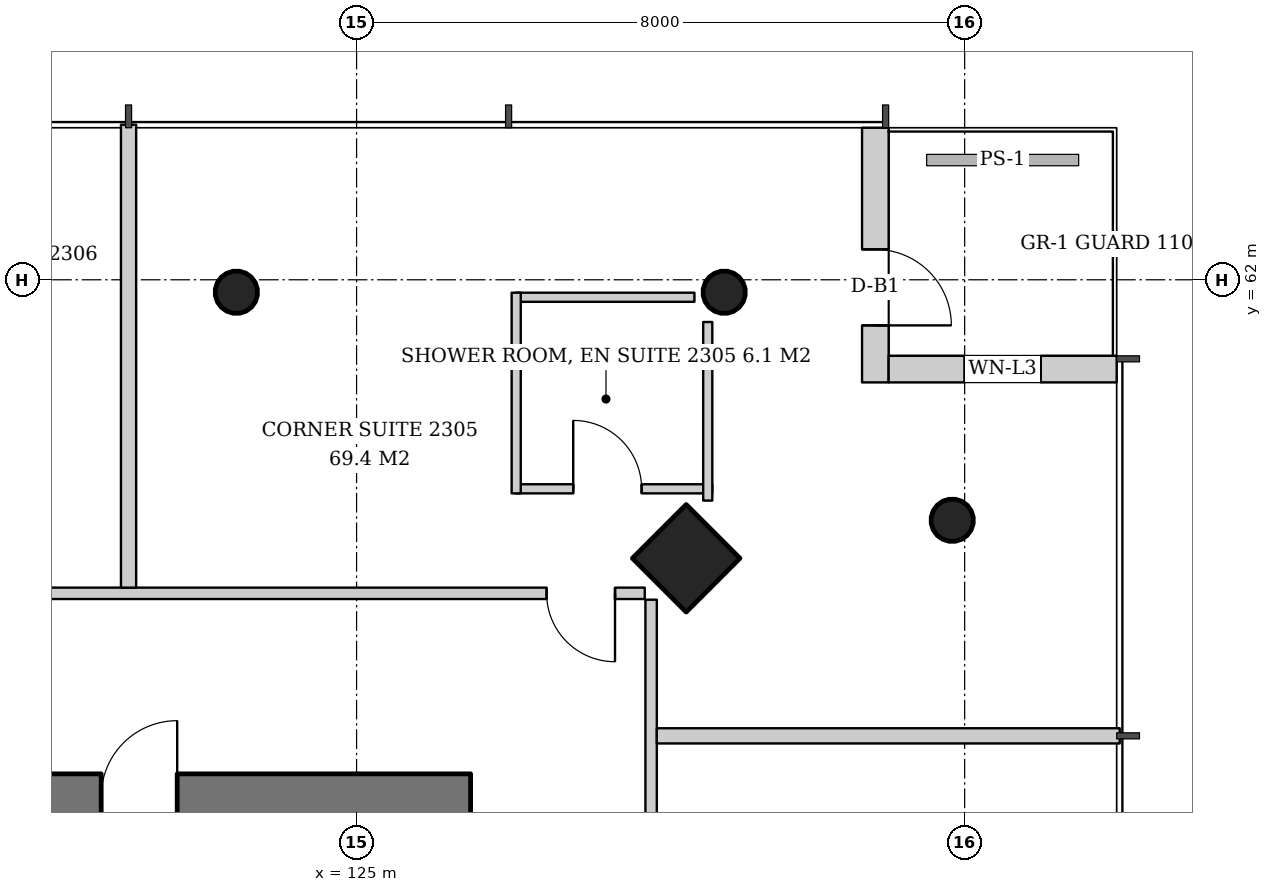
"""IFC4 building model, lengths in metres.
Left out: names, types, materials, properties, quantities, classifications, styles, units other than length and angle.
Written with IfcOpenShell. Run it as: python <this file> out.ifc"""

import sys

from ifc_helpers import new_model, si_unit, direction, frame, frame_2d, origin, origin_2d, place, context, subcontext, project, spatial, rectangle, hollow_circle, extrude, element, fill, save


model = new_model("IFC4")
c1 = context("Model", 3, precision=1e-05, world=origin(), true_north=direction((0.0, 1.0)))
c2 = subcontext(c1, "Body", "Model", "MODEL_VIEW")
j1 = project(units=[si_unit("LENGTHUNIT", "METRE"), si_unit("PLANEANGLEUNIT", "RADIAN")], contexts=[c1])
p1 = place(None, origin())
s1 = spatial("IfcSite", under=j1, at=p1, CompositionType="ELEMENT")
p2 = place(p1, origin())
s2 = spatial("IfcBuilding", under=s1, at=p2, CompositionType="ELEMENT")
p3 = place(p2, frame((0.0, 0.0, 93.2)))
s3 = spatial("IfcBuildingStorey", under=s2, at=p3, CompositionType="ELEMENT", Elevation=93.2)
p4 = place(p3, frame((129.388, 58.388, 0.0), z_axis=(-0.043029647111, -0.043029647111, 0.998146732169), x_axis=(0.707106781187, -0.707106781187, 0.0)))
e1 = element("IfcColumn", 1, at=p4, inside=s3, PredefinedType="COLUMN", context=c2, shape_type="SweptSolid", body=[
    extrude(rectangle(XDim=1.0, YDim=1.0, at=origin_2d()), origin(), (0.0, 0.0, 1.0), 3.807),
])
for number, where, z_axis, x_axis in (
    (2, (132.888, 58.888, 0.0), (-0.043, -0.043, 0.998), (0.707, -0.707, 0.0)),
    (3, (129.888, 61.888, 0.0), (-0.043, -0.043, 0.998), (0.707, -0.707, 0.0)),
):
    element("IfcColumn", number, at=place(p3, frame(where, z_axis=z_axis, x_axis=x_axis)), inside=s3, PredefinedType="COLUMN", context=c2, shape_type="SweptSolid", body=[
        extrude(hollow_circle(Radius=0.28, WallThickness=0.02, at=origin_2d()), origin(), (0.0, 0.0, 1.0), 3.807),
    ])
p5 = place(p3, frame((123.444, 61.888, 0.0), z_axis=(-0.021497706284, -0.043059584825, 0.998841188968), x_axis=(0.894693706707, -0.446680166538, 0.0)))
e4 = element("IfcColumn", 4, at=p5, inside=s3, PredefinedType="COLUMN", context=c2, shape_type="SweptSolid", body=[
    extrude(hollow_circle(Radius=0.28, WallThickness=0.02, at=origin_2d()), origin(), (0.0, 0.0, 1.0), 3.804),
])
p6 = place(p3, frame((107.5, 55.2, 0.0), z_axis=(0.0, 0.0, 1.0), x_axis=(1.0, 0.0, 0.0)))
e5 = element("IfcWall", 5, at=p6, inside=s3, PredefinedType="SHEAR", context=c2, shape_type="SweptSolid", body=[
    extrude(rectangle(XDim=19.0, YDim=0.6, at=frame_2d((9.5, 0.0))), origin(), (0.0, 0.0, 1.0), 3.8),
])
p7 = place(p6, frame((14.14, 0.0, 0.0)))
e6 = element("IfcOpeningElement", 6, at=p7, cuts=e5, PredefinedType="OPENING", context=c2, shape_type="SweptSolid", body=[
    extrude(rectangle(XDim=1.0, YDim=2.1, at=frame_2d((0.5, 1.05))), frame((0.0, 0.31, 0.0), z_axis=(0.0, -1.0, 0.0), x_axis=(1.0, 0.0, 0.0)), (0.0, 0.0, 1.0), 0.62),
])
p8 = place(p6, frame((1.675, 0.0, 0.0)))
e7 = element("IfcOpeningElement", 7, at=p8, cuts=e5, PredefinedType="OPENING", context=c2, shape_type="SweptSolid", body=[
    extrude(rectangle(XDim=1.0, YDim=2.1, at=frame_2d((0.5, 1.05))), frame((0.0, 0.31, 0.0), z_axis=(0.0, -1.0, 0.0), x_axis=(1.0, 0.0, 0.0)), (0.0, 0.0, 1.0), 0.62),
])
p9 = place(p6, frame((3.587, 0.0, 0.0)))
e8 = element("IfcOpeningElement", 8, at=p9, cuts=e5, PredefinedType="OPENING", context=c2, shape_type="SweptSolid", body=[
    extrude(rectangle(XDim=1.0, YDim=2.1, at=frame_2d((0.5, 1.05))), frame((0.0, 0.31, 0.0), z_axis=(0.0, -1.0, 0.0), x_axis=(1.0, 0.0, 0.0)), (0.0, 0.0, 1.0), 0.62),
])
p10 = place(p3, frame((131.825, 64.0, 0.0), z_axis=(0.0, 0.0, 1.0), x_axis=(0.0, -1.0, 0.0)))
e9 = element("IfcWall", 9, at=p10, inside=s3, PredefinedType="SOLIDWALL", context=c2, shape_type="SweptSolid", body=[
    extrude(rectangle(XDim=3.35, YDim=0.35, at=frame_2d((1.675, 0.0))), origin(), (0.0, 0.0, 1.0), 3.6),
])
p11 = place(p10, frame((1.6, 0.0, 0.0)))
e10 = element("IfcOpeningElement", 10, at=p11, cuts=e9, PredefinedType="OPENING", context=c2, shape_type="SweptSolid", body=[
    extrude(rectangle(XDim=1.0, YDim=2.4, at=frame_2d((0.5, 1.2))), frame((0.0, 0.185, 0.0), z_axis=(0.0, -1.0, 0.0), x_axis=(1.0, 0.0, 0.0)), (0.0, 0.0, 1.0), 0.37),
])
p12 = place(p3, frame((132.0, 60.825, 0.0), z_axis=(0.0, 0.0, 1.0), x_axis=(1.0, 0.0, 0.0)))
e11 = element("IfcWall", 11, at=p12, inside=s3, PredefinedType="SOLIDWALL", context=c2, shape_type="SweptSolid", body=[
    extrude(rectangle(XDim=3.0, YDim=0.35, at=frame_2d((1.5, 0.0))), origin(), (0.0, 0.0, 1.0), 3.6),
])
p13 = place(p12, frame((1.0, 0.0, 0.9)))
e12 = element("IfcOpeningElement", 12, at=p13, cuts=e11, PredefinedType="OPENING", context=c2, shape_type="SweptSolid", body=[
    extrude(rectangle(XDim=1.0, YDim=2.4, at=frame_2d((0.5, 1.2))), frame((0.0, 0.185, 0.0), z_axis=(0.0, -1.0, 0.0), x_axis=(1.0, 0.0, 0.0)), (0.0, 0.0, 1.0), 0.37),
])
p14 = place(p3, frame((128.875, 34.209, 0.0), z_axis=(0.0, 0.0, 1.0), x_axis=(0.0, 1.0, 0.0)))
e13 = element("IfcWall", 13, at=p14, inside=s3, PredefinedType="PARTITIONING", context=c2, shape_type="SweptSolid", body=[
    extrude(rectangle(XDim=23.583, YDim=0.15, at=frame_2d((11.791, 0.0))), origin(), (0.0, 0.0, 1.0), 2.9),
])
p15 = place(p14, frame((0.391, 0.0, 0.0)))
e14 = element("IfcOpeningElement", 14, at=p15, cuts=e13, PredefinedType="OPENING", context=c2, shape_type="SweptSolid", body=[
    extrude(rectangle(XDim=0.9, YDim=2.1, at=frame_2d((0.45, 1.05))), frame((0.0, 0.085, 0.0), z_axis=(0.0, -1.0, 0.0), x_axis=(1.0, 0.0, 0.0)), (0.0, 0.0, 1.0), 0.17),
])
p16 = place(p14, frame((4.541, 0.0, 0.0)))
e15 = element("IfcOpeningElement", 15, at=p16, cuts=e13, PredefinedType="OPENING", context=c2, shape_type="SweptSolid", body=[
    extrude(rectangle(XDim=0.9, YDim=2.1, at=frame_2d((0.45, 1.05))), frame((0.0, 0.085, 0.0), z_axis=(0.0, -1.0, 0.0), x_axis=(1.0, 0.0, 0.0)), (0.0, 0.0, 1.0), 0.17),
])
p17 = place(p14, frame((12.891, 0.0, 0.0)))
e16 = element("IfcOpeningElement", 16, at=p17, cuts=e13, PredefinedType="OPENING", context=c2, shape_type="SweptSolid", body=[
    extrude(rectangle(XDim=0.9, YDim=2.1, at=frame_2d((0.45, 1.05))), frame((0.0, 0.085, 0.0), z_axis=(0.0, -1.0, 0.0), x_axis=(1.0, 0.0, 0.0)), (0.0, 0.0, 1.0), 0.17),
])
p18 = place(p14, frame((19.541, 0.0, 0.0)))
e17 = element("IfcOpeningElement", 17, at=p18, cuts=e13, PredefinedType="OPENING", context=c2, shape_type="SweptSolid", body=[
    extrude(rectangle(XDim=0.9, YDim=2.1, at=frame_2d((0.45, 1.05))), frame((0.0, 0.085, 0.0), z_axis=(0.0, -1.0, 0.0), x_axis=(1.0, 0.0, 0.0)), (0.0, 0.0, 1.0), 0.17),
])
p19 = place(p3, frame((128.95, 56.0, 0.0), z_axis=(0.0, 0.0, 1.0), x_axis=(1.0, 0.0, 0.0)))
e18 = element("IfcWall", 18, at=p19, inside=s3, PredefinedType="PARTITIONING", context=c2, shape_type="SweptSolid", body=[
    extrude(rectangle(XDim=6.09, YDim=0.2, at=frame_2d((3.045, 0.0))), origin(), (0.0, 0.0, 1.0), 3.2),
])
p20 = place(p3, frame((127.1, 59.25, 0.0), z_axis=(0.0, 0.0, 1.0), x_axis=(1.0, 0.0, 0.0)))
e19 = element("IfcWall", 19, at=p20, inside=s3, PredefinedType="PARTITIONING", context=c2, shape_type="SweptSolid", body=[
    extrude(rectangle(XDim=2.58, YDim=0.12, at=frame_2d((1.29, 0.0))), origin(), (0.0, 0.0, 1.0), 3.2),
])
p21 = place(p20, frame((0.75, 0.0, 0.0)))
e20 = element("IfcOpeningElement", 20, at=p21, cuts=e19, PredefinedType="OPENING", context=c2, shape_type="SweptSolid", body=[
    extrude(rectangle(XDim=0.9, YDim=2.1, at=frame_2d((0.45, 1.05))), frame((0.0, 0.07, 0.0), z_axis=(0.0, -1.0, 0.0), x_axis=(1.0, 0.0, 0.0)), (0.0, 0.0, 1.0), 0.14),
])
p22 = place(p3, frame((127.1, 61.77, 0.0), z_axis=(0.0, 0.0, 1.0), x_axis=(1.0, 0.0, 0.0)))
e21 = element("IfcWall", 21, at=p22, inside=s3, PredefinedType="PARTITIONING", context=c2, shape_type="SweptSolid", body=[
    extrude(rectangle(XDim=2.344, YDim=0.12, at=frame_2d((1.172, 0.0))), origin(), (0.0, 0.0, 1.0), 3.2),
])
p23 = place(p3, frame((129.62, 59.095, 0.0), z_axis=(0.0, 0.0, 1.0), x_axis=(0.0, 1.0, 0.0)))
e22 = element("IfcWall", 22, at=p23, inside=s3, PredefinedType="PARTITIONING", context=c2, shape_type="SweptSolid", body=[
    extrude(rectangle(XDim=2.35, YDim=0.12, at=frame_2d((1.175, 0.0))), origin(), (0.0, 0.0, 1.0), 3.2),
])
p24 = place(p3, frame((127.1, 59.19, 0.0), z_axis=(0.0, 0.0, 1.0), x_axis=(0.0, 1.0, 0.0)))
e23 = element("IfcWall", 23, at=p24, inside=s3, PredefinedType="PARTITIONING", context=c2, shape_type="SweptSolid", body=[
    extrude(rectangle(XDim=2.64, YDim=0.12, at=frame_2d((1.32, 0.0))), origin(), (0.0, 0.0, 1.0), 3.2),
])
p25 = place(p3, frame((128.791, 57.875, 0.0), z_axis=(0.0, 0.0, 1.0), x_axis=(-1.0, 0.0, 0.0)))
e24 = element("IfcWall", 24, at=p25, inside=s3, PredefinedType="PARTITIONING", context=c2, shape_type="SweptSolid", body=[
    extrude(rectangle(XDim=23.583, YDim=0.15, at=frame_2d((11.791, 0.0))), origin(), (0.0, 0.0, 1.0), 2.9),
])
p26 = place(p25, frame((0.391, 0.0, 0.0)))
e25 = element("IfcOpeningElement", 25, at=p26, cuts=e24, PredefinedType="OPENING", context=c2, shape_type="SweptSolid", body=[
    extrude(rectangle(XDim=0.9, YDim=2.1, at=frame_2d((0.45, 1.05))), frame((0.0, 0.085, 0.0), z_axis=(0.0, -1.0, 0.0), x_axis=(1.0, 0.0, 0.0)), (0.0, 0.0, 1.0), 0.17),
])
p27 = place(p25, frame((8.141, 0.0, 0.0)))
e26 = element("IfcOpeningElement", 26, at=p27, cuts=e24, PredefinedType="OPENING", context=c2, shape_type="SweptSolid", body=[
    extrude(rectangle(XDim=0.9, YDim=2.1, at=frame_2d((0.45, 1.05))), frame((0.0, 0.085, 0.0), z_axis=(0.0, -1.0, 0.0), x_axis=(1.0, 0.0, 0.0)), (0.0, 0.0, 1.0), 0.17),
])
p28 = place(p25, frame((14.541, 0.0, 0.0)))
e27 = element("IfcOpeningElement", 27, at=p28, cuts=e24, PredefinedType="OPENING", context=c2, shape_type="SweptSolid", body=[
    extrude(rectangle(XDim=0.9, YDim=2.1, at=frame_2d((0.45, 1.05))), frame((0.0, 0.085, 0.0), z_axis=(0.0, -1.0, 0.0), x_axis=(1.0, 0.0, 0.0)), (0.0, 0.0, 1.0), 0.17),
])
p29 = place(p25, frame((18.141, 0.0, 0.0)))
e28 = element("IfcOpeningElement", 28, at=p29, cuts=e24, PredefinedType="OPENING", context=c2, shape_type="SweptSolid", body=[
    extrude(rectangle(XDim=0.9, YDim=2.1, at=frame_2d((0.45, 1.05))), frame((0.0, 0.085, 0.0), z_axis=(0.0, -1.0, 0.0), x_axis=(1.0, 0.0, 0.0)), (0.0, 0.0, 1.0), 0.17),
])
p30 = place(p3, frame((122.0, 57.95, 0.0), z_axis=(0.0, 0.0, 1.0), x_axis=(0.0, 1.0, 0.0)))
e29 = element("IfcWall", 29, at=p30, inside=s3, PredefinedType="PARTITIONING", context=c2, shape_type="SweptSolid", body=[
    extrude(rectangle(XDim=6.09, YDim=0.2, at=frame_2d((3.045, 0.0))), origin(), (0.0, 0.0, 1.0), 3.0),
])
p31 = place(p11, origin())
e30 = element("IfcDoor", 30, at=p31, inside=s3, OperationType="SINGLE_SWING_RIGHT", PredefinedType="DOOR", context=c2, shape_type="SweptSolid", body=[
    extrude(rectangle(XDim=1.0, YDim=2.4, at=frame_2d((0.5, 1.2))), frame((0.0, 0.025, 0.0), z_axis=(0.0, -1.0, 0.0), x_axis=(1.0, 0.0, 0.0)), (0.0, 0.0, 1.0), 0.05),
])
fill(e10, e30)
p32 = place(p13, origin())
e31 = element("IfcWindow", 31, at=p32, inside=s3, PartitioningType="SINGLE_PANEL", PredefinedType="WINDOW", context=c2, shape_type="SweptSolid", body=[
    extrude(rectangle(XDim=1.0, YDim=2.4, at=frame_2d((0.5, 1.2))), frame((0.0, 0.03, 0.0), z_axis=(0.0, -1.0, 0.0), x_axis=(1.0, 0.0, 0.0)), (0.0, 0.0, 1.0), 0.06),
])
fill(e12, e31)
p33 = place(p7, origin())
e32 = element("IfcDoor", 32, at=p33, inside=s3, OperationType="SINGLE_SWING_RIGHT", PredefinedType="DOOR", context=c2, shape_type="SweptSolid", body=[
    extrude(rectangle(XDim=1.0, YDim=2.1, at=frame_2d((0.5, 1.05))), frame((0.0, 0.025, 0.0), z_axis=(0.0, -1.0, 0.0), x_axis=(1.0, 0.0, 0.0)), (0.0, 0.0, 1.0), 0.05),
])
fill(e6, e32)
p34 = place(p21, origin())
e33 = element("IfcDoor", 33, at=p34, inside=s3, OperationType="SINGLE_SWING_LEFT", PredefinedType="DOOR", context=c2, shape_type="SweptSolid", body=[
    extrude(rectangle(XDim=0.9, YDim=2.1, at=frame_2d((0.45, 1.05))), frame((0.0, 0.025, 0.0), z_axis=(0.0, -1.0, 0.0), x_axis=(1.0, 0.0, 0.0)), (0.0, 0.0, 1.0), 0.05),
])
fill(e20, e33)
p35 = place(p26, origin())
e34 = element("IfcDoor", 34, at=p35, inside=s3, OperationType="SINGLE_SWING_LEFT", PredefinedType="DOOR", context=c2, shape_type="SweptSolid", body=[
    extrude(rectangle(XDim=0.9, YDim=2.1, at=frame_2d((0.45, 1.05))), frame((0.0, 0.025, 0.0), z_axis=(0.0, -1.0, 0.0), x_axis=(1.0, 0.0, 0.0)), (0.0, 0.0, 1.0), 0.05),
])
fill(e25, e34)
save(model, sys.argv[1])
